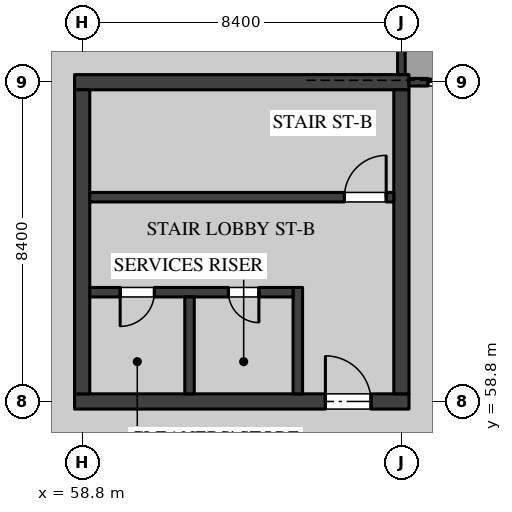
"""IFC4 building model, lengths in metres.
Left out: names, types, materials, properties, quantities, classifications, styles, units other than length and angle.
Written with IfcOpenShell. Run it as: python <this file> out.ifc"""

import sys

from ifc_helpers import new_model, si_unit, direction, frame, frame_2d, origin, place, context, subcontext, project, spatial, rectangle, extrude, element, fill, save


model = new_model("IFC4")
c1 = context("Model", 3, precision=1e-05, world=origin(), true_north=direction((0.0, 1.0)))
c2 = subcontext(c1, "Body", "Model", "MODEL_VIEW")
j1 = project(units=[si_unit("LENGTHUNIT", "METRE"), si_unit("PLANEANGLEUNIT", "RADIAN")], contexts=[c1])
p1 = place(None, origin())
s1 = spatial("IfcSite", under=j1, at=p1, CompositionType="ELEMENT")
p2 = place(p1, origin())
s2 = spatial("IfcBuilding", under=s1, at=p2, CompositionType="ELEMENT")
p3 = place(p2, frame((0.0, 0.0, -4.5)))
s3 = spatial("IfcBuildingStorey", under=s2, at=p3, CompositionType="ELEMENT", Elevation=-4.5)
p4 = place(p3, frame((58.6, 58.8, 0.0), z_axis=(0.0, 0.0, 1.0), x_axis=(1.0, 0.0, 0.0)))
e1 = element("IfcWall", 1, at=p4, inside=s3, PredefinedType="SHEAR", context=c2, shape_type="SweptSolid", body=[
    extrude(rectangle(XDim=8.8, YDim=0.4, at=frame_2d((4.4, 0.0))), origin(), (0.0, 0.0, 1.0), 4.05),
])
p5 = place(p4, frame((6.6, 0.0, 0.0)))
e2 = element("IfcOpeningElement", 2, at=p5, cuts=e1, PredefinedType="OPENING", context=c2, shape_type="SweptSolid", body=[
    extrude(rectangle(XDim=1.2, YDim=2.1, at=frame_2d((0.6, 1.05))), frame((0.0, 0.21, 0.0), z_axis=(0.0, -1.0, 0.0), x_axis=(1.0, 0.0, 0.0)), (0.0, 0.0, 1.0), 0.42),
])
p6 = place(p3, frame((58.6, 67.2, 0.0), z_axis=(0.0, 0.0, 1.0), x_axis=(1.0, 0.0, 0.0)))
e3 = element("IfcWall", 3, at=p6, inside=s3, PredefinedType="SHEAR", context=c2, shape_type="SweptSolid", body=[
    extrude(rectangle(XDim=8.8, YDim=0.4, at=frame_2d((4.4, 0.0))), origin(), (0.0, 0.0, 1.0), 4.05),
])
for number, where, z_axis, x_axis in (
    (4, (58.8, 59.0, 0.0), (0.0, 0.0, 1.0), (0.0, 1.0, 0.0)),
    (5, (67.2, 59.0, 0.0), (0.0, 0.0, 1.0), (0.0, 1.0, 0.0)),
):
    element("IfcWall", number, at=place(p3, frame(where, z_axis=z_axis, x_axis=x_axis)), inside=s3, PredefinedType="SHEAR", context=c2, shape_type="SweptSolid", body=[
        extrude(rectangle(XDim=8.0, YDim=0.4, at=frame_2d((4.0, 0.0))), origin(), (0.0, 0.0, 1.0), 4.05),
    ])
p7 = place(p3, frame((67.0, 64.175, 0.0), z_axis=(0.0, 0.0, 1.0), x_axis=(-1.0, 0.0, 0.0)))
e6 = element("IfcWall", 6, at=p7, inside=s3, PredefinedType="SOLIDWALL", context=c2, shape_type="SweptSolid", body=[
    extrude(rectangle(XDim=8.0, YDim=0.25, at=frame_2d((4.0, 0.0))), origin(), (0.0, 0.0, 1.0), 4.05),
])
p8 = place(p7, frame((0.2, 0.0, 0.0)))
e7 = element("IfcOpeningElement", 7, at=p8, cuts=e6, PredefinedType="OPENING", context=c2, shape_type="SweptSolid", body=[
    extrude(rectangle(XDim=1.1, YDim=2.1, at=frame_2d((0.55, 1.05))), frame((0.0, 0.135, 0.0), z_axis=(0.0, -1.0, 0.0), x_axis=(1.0, 0.0, 0.0)), (0.0, 0.0, 1.0), 0.27),
])
p9 = place(p3, frame((64.475, 61.8, 0.0), z_axis=(0.0, 0.0, 1.0), x_axis=(0.0, -1.0, 0.0)))
e8 = element("IfcWall", 8, at=p9, inside=s3, PredefinedType="SOLIDWALL", context=c2, shape_type="SweptSolid", body=[
    extrude(rectangle(XDim=2.8, YDim=0.25, at=frame_2d((1.4, 0.0))), origin(), (0.0, 0.0, 1.0), 4.05),
])
p10 = place(p3, frame((64.35, 61.675, 0.0), z_axis=(0.0, 0.0, 1.0), x_axis=(-1.0, 0.0, 0.0)))
e9 = element("IfcWall", 9, at=p10, inside=s3, PredefinedType="SOLIDWALL", context=c2, shape_type="SweptSolid", body=[
    extrude(rectangle(XDim=5.35, YDim=0.25, at=frame_2d((2.675, 0.0))), origin(), (0.0, 0.0, 1.0), 4.05),
])
p11 = place(p10, frame((3.65, 0.0, 0.0)))
e10 = element("IfcOpeningElement", 10, at=p11, cuts=e9, PredefinedType="OPENING", context=c2, shape_type="SweptSolid", body=[
    extrude(rectangle(XDim=0.9, YDim=2.1, at=frame_2d((0.45, 1.05))), frame((0.0, 0.135, 0.0), z_axis=(0.0, -1.0, 0.0), x_axis=(1.0, 0.0, 0.0)), (0.0, 0.0, 1.0), 0.27),
])
p12 = place(p10, frame((0.9, 0.0, 0.0)))
e11 = element("IfcOpeningElement", 11, at=p12, cuts=e9, PredefinedType="OPENING", context=c2, shape_type="SweptSolid", body=[
    extrude(rectangle(XDim=0.8, YDim=2.1, at=frame_2d((0.4, 1.05))), frame((0.0, 0.135, 0.0), z_axis=(0.0, -1.0, 0.0), x_axis=(1.0, 0.0, 0.0)), (0.0, 0.0, 1.0), 0.27),
])
p13 = place(p3, frame((61.625, 61.55, 0.0), z_axis=(0.0, 0.0, 1.0), x_axis=(0.0, -1.0, 0.0)))
e12 = element("IfcWall", 12, at=p13, inside=s3, PredefinedType="SOLIDWALL", context=c2, shape_type="SweptSolid", body=[
    extrude(rectangle(XDim=2.55, YDim=0.25, at=frame_2d((1.275, 0.0))), origin(), (0.0, 0.0, 1.0), 4.05),
])
p14 = place(p3, frame((67.2, 67.4, 0.0), z_axis=(0.0, 0.0, 1.0), x_axis=(0.0, 1.0, 0.0)))
e13 = element("IfcWall", 13, at=p14, inside=s3, PredefinedType="PARTITIONING", context=c2, shape_type="SweptSolid", body=[
    extrude(rectangle(XDim=7.8, YDim=0.2, at=frame_2d((3.9, 0.0))), origin(), (0.0, 0.0, 1.0), 4.05),
])
p15 = place(p3, frame((67.4, 67.2, 0.0), z_axis=(0.0, 0.0, 1.0), x_axis=(1.0, 0.0, 0.0)))
e14 = element("IfcWall", 14, at=p15, inside=s3, PredefinedType="PARTITIONING", context=c2, shape_type="SweptSolid", body=[
    extrude(rectangle(XDim=7.8, YDim=0.2, at=frame_2d((3.9, 0.0))), origin(), (0.0, 0.0, 1.0), 4.05),
])
p16 = place(p15, frame((0.5, 0.0, 0.0)))
e15 = element("IfcOpeningElement", 15, at=p16, cuts=e14, PredefinedType="OPENING", context=c2, shape_type="SweptSolid", body=[
    extrude(rectangle(XDim=3.2, YDim=3.0, at=frame_2d((1.6, 1.5))), frame((0.0, 0.11, 0.0), z_axis=(0.0, -1.0, 0.0), x_axis=(1.0, 0.0, 0.0)), (0.0, 0.0, 1.0), 0.22),
])
p17 = place(p15, frame((3.9, 0.0, 0.0)))
e16 = element("IfcOpeningElement", 16, at=p17, cuts=e14, PredefinedType="OPENING", context=c2, shape_type="SweptSolid", body=[
    extrude(rectangle(XDim=3.2, YDim=3.0, at=frame_2d((1.6, 1.5))), frame((0.0, 0.11, 0.0), z_axis=(0.0, -1.0, 0.0), x_axis=(1.0, 0.0, 0.0)), (0.0, 0.0, 1.0), 0.22),
])
p18 = place(p11, origin())
e17 = element("IfcDoor", 17, at=p18, inside=s3, OperationType="SINGLE_SWING_LEFT", PredefinedType="DOOR", context=c2, shape_type="SweptSolid", body=[
    extrude(rectangle(XDim=0.9, YDim=2.1, at=frame_2d((0.45, 1.05))), frame((0.0, 0.035, 0.0), z_axis=(0.0, -1.0, 0.0), x_axis=(1.0, 0.0, 0.0)), (0.0, 0.0, 1.0), 0.07),
])
fill(e10, e17)
p19 = place(p5, origin())
e18 = element("IfcDoor", 18, at=p19, inside=s3, OperationType="SINGLE_SWING_RIGHT", PredefinedType="DOOR", context=c2, shape_type="SweptSolid", body=[
    extrude(rectangle(XDim=1.2, YDim=2.1, at=frame_2d((0.6, 1.05))), frame((0.0, 0.035, 0.0), z_axis=(0.0, -1.0, 0.0), x_axis=(1.0, 0.0, 0.0)), (0.0, 0.0, 1.0), 0.07),
])
fill(e2, e18)
p20 = place(p12, origin())
e19 = element("IfcDoor", 19, at=p20, inside=s3, OperationType="SINGLE_SWING_RIGHT", PredefinedType="DOOR", context=c2, shape_type="SweptSolid", body=[
    extrude(rectangle(XDim=0.8, YDim=2.1, at=frame_2d((0.4, 1.05))), frame((0.0, 0.035, 0.0), z_axis=(0.0, -1.0, 0.0), x_axis=(1.0, 0.0, 0.0)), (0.0, 0.0, 1.0), 0.07),
])
fill(e11, e19)
p21 = place(p8, frame((1.1, 0.0, 0.0), z_axis=(0.0, 0.0, 1.0), x_axis=(-1.0, 0.0, 0.0)))
e20 = element("IfcDoor", 20, at=p21, inside=s3, OperationType="SINGLE_SWING_LEFT", PredefinedType="DOOR", context=c2, shape_type="SweptSolid", body=[
    extrude(rectangle(XDim=1.1, YDim=2.1, at=frame_2d((0.55, 1.05))), frame((0.0, 0.035, 0.0), z_axis=(0.0, -1.0, 0.0), x_axis=(1.0, 0.0, 0.0)), (0.0, 0.0, 1.0), 0.07),
])
fill(e7, e20)
p22 = place(p16, origin())
e21 = element("IfcDoor", 21, at=p22, inside=s3, OperationType="SLIDING_TO_LEFT", PredefinedType="GATE", context=c2, shape_type="SweptSolid", body=[
    extrude(rectangle(XDim=3.2, YDim=3.0, at=frame_2d((1.6, 1.5))), frame((0.0, 0.025, 0.0), z_axis=(0.0, -1.0, 0.0), x_axis=(1.0, 0.0, 0.0)), (0.0, 0.0, 1.0), 0.05),
])
fill(e15, e21)
save(model, sys.argv[1])
